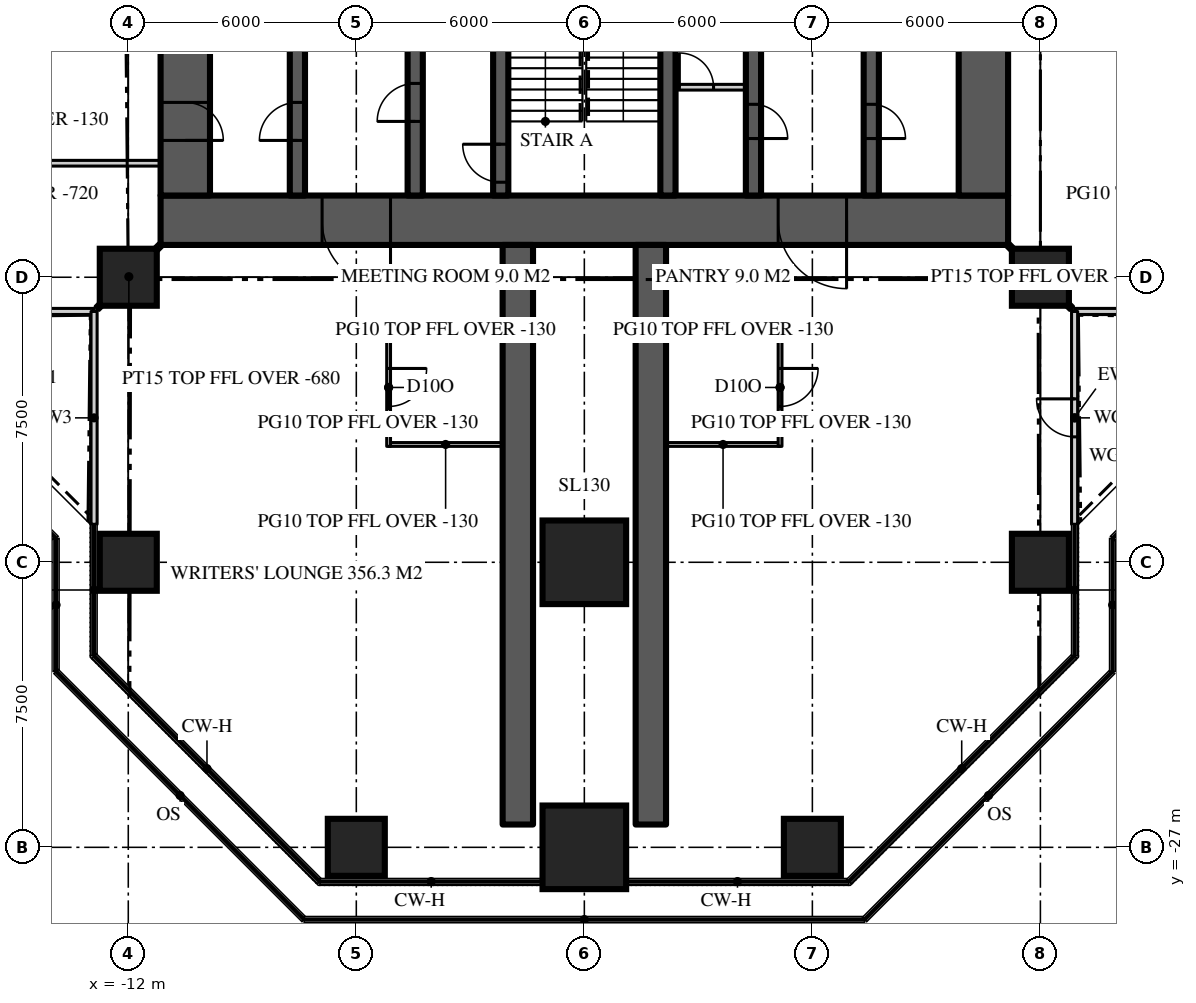
"""IFC4 building model, lengths in metres.
Left out: names, types, materials, properties, quantities, classifications, styles, units other than length and angle.
Written with IfcOpenShell. Run it as: python <this file> out.ifc"""

import sys

from ifc_helpers import new_model, si_unit, direction, frame, frame_2d, origin, origin_2d, place, context, subcontext, project, spatial, rectangle, extrude, element, fill, save


model = new_model("IFC4")
c1 = context("Model", 3, precision=1e-05, world=origin(), true_north=direction((0.0, 1.0)))
c2 = subcontext(c1, "Body", "Model", "MODEL_VIEW")
j1 = project(units=[si_unit("LENGTHUNIT", "METRE"), si_unit("PLANEANGLEUNIT", "RADIAN")], contexts=[c1])
p1 = place(None, origin())
s1 = spatial("IfcSite", under=j1, at=p1, CompositionType="ELEMENT")
p2 = place(p1, origin())
s2 = spatial("IfcBuilding", under=s1, at=p2, CompositionType="ELEMENT")
p3 = place(p2, frame((0.0, 0.0, 255.6)))
s3 = spatial("IfcBuildingStorey", under=s2, at=p3, CompositionType="ELEMENT", Elevation=255.6)
p4 = place(p3, frame((11.15, -10.5, 0.0), z_axis=(0.0, 0.0, 1.0), x_axis=(-1.0, 0.0, 0.0)))
e1 = element("IfcWall", 1, at=p4, inside=s3, PredefinedType="SHEAR", context=c2, shape_type="SweptSolid", body=[
    extrude(rectangle(XDim=22.3, YDim=1.3, at=frame_2d((11.15, 0.0))), origin(), (0.0, 0.0, 1.0), 3.9),
])
p5 = place(p4, frame((16.25, 0.0, 0.0)))
e2 = element("IfcOpeningElement", 2, at=p5, cuts=e1, PredefinedType="OPENING", context=c2, shape_type="SweptSolid", body=[
    extrude(rectangle(XDim=1.8, YDim=2.2, at=frame_2d((0.9, 1.1))), frame((0.0, 0.66, 0.0), z_axis=(0.0, -1.0, 0.0), x_axis=(1.0, 0.0, 0.0)), (0.0, 0.0, 1.0), 1.32),
])
p6 = place(p4, frame((4.25, 0.0, 0.0)))
e3 = element("IfcOpeningElement", 3, at=p6, cuts=e1, PredefinedType="OPENING", context=c2, shape_type="SweptSolid", body=[
    extrude(rectangle(XDim=1.8, YDim=2.2, at=frame_2d((0.9, 1.1))), frame((0.0, 0.66, 0.0), z_axis=(0.0, -1.0, 0.0), x_axis=(1.0, 0.0, 0.0)), (0.0, 0.0, 1.0), 1.32),
])
p7 = place(p3, frame((10.5, -9.85, 0.0), z_axis=(0.0, 0.0, 1.0), x_axis=(0.0, 1.0, 0.0)))
e4 = element("IfcWall", 4, at=p7, inside=s3, PredefinedType="SHEAR", context=c2, shape_type="SweptSolid", body=[
    extrude(rectangle(XDim=19.7, YDim=1.3, at=frame_2d((9.85, 0.0))), origin(), (0.0, 0.0, 1.0), 3.9),
])
p8 = place(p7, frame((17.25, 0.0, 0.0)))
e5 = element("IfcOpeningElement", 5, at=p8, cuts=e4, PredefinedType="OPENING", context=c2, shape_type="SweptSolid", body=[
    extrude(rectangle(XDim=1.0, YDim=2.2, at=frame_2d((0.5, 1.1))), frame((0.0, 0.66, 0.0), z_axis=(0.0, -1.0, 0.0), x_axis=(1.0, 0.0, 0.0)), (0.0, 0.0, 1.0), 1.32),
])
p9 = place(p3, frame((-10.5, 9.85, 0.0), z_axis=(0.0, 0.0, 1.0), x_axis=(0.0, -1.0, 0.0)))
e6 = element("IfcWall", 6, at=p9, inside=s3, PredefinedType="SHEAR", context=c2, shape_type="SweptSolid", body=[
    extrude(rectangle(XDim=19.7, YDim=1.3, at=frame_2d((9.85, 0.0))), origin(), (0.0, 0.0, 1.0), 3.9),
])
p10 = place(p9, frame((17.25, 0.0, 0.0)))
e7 = element("IfcOpeningElement", 7, at=p10, cuts=e6, PredefinedType="OPENING", context=c2, shape_type="SweptSolid", body=[
    extrude(rectangle(XDim=1.0, YDim=2.2, at=frame_2d((0.5, 1.1))), frame((0.0, 0.66, 0.0), z_axis=(0.0, -1.0, 0.0), x_axis=(1.0, 0.0, 0.0)), (0.0, 0.0, 1.0), 1.32),
])
for number, where, z_axis, x_axis in (
    (8, (-1.75, -11.15, 0.0), (0.0, 0.0, 1.0), (0.0, -1.0, 0.0)),
    (9, (1.75, -11.15, 0.0), (0.0, 0.0, 1.0), (0.0, -1.0, 0.0)),
):
    element("IfcWall", number, at=place(p3, frame(where, z_axis=z_axis, x_axis=x_axis)), inside=s3, PredefinedType="SHEAR", context=c2, shape_type="SweptSolid", body=[
        extrude(rectangle(XDim=15.25, YDim=0.8, at=frame_2d((7.625, 0.0))), origin(), (0.0, 0.0, 1.0), 3.9),
    ])
p11 = place(p3, frame((-6.0, -27.0, 0.0), z_axis=(0.0, 0.0, 1.0), x_axis=(1.0, 0.0, 0.0)))
e10 = element("IfcColumn", 10, at=p11, inside=s3, PredefinedType="COLUMN", context=c2, shape_type="SweptSolid", body=[
    extrude(rectangle(XDim=1.5, YDim=1.5, at=origin_2d()), origin(), (0.0, 0.0, 1.0), 3.9),
])
p12 = place(p3, frame((0.0, -27.0, 0.0), z_axis=(0.0, 0.0, 1.0), x_axis=(1.0, 0.0, 0.0)))
e11 = element("IfcColumn", 11, at=p12, inside=s3, PredefinedType="COLUMN", context=c2, shape_type="SweptSolid", body=[
    extrude(rectangle(XDim=2.2, YDim=2.2, at=origin_2d()), origin(), (0.0, 0.0, 1.0), 3.9),
])
for number, where, z_axis, x_axis in (
    (12, (6.0, -27.0, 0.0), (0.0, 0.0, 1.0), (1.0, 0.0, 0.0)),
    (13, (-12.0, -19.5, 0.0), (0.0, 0.0, 1.0), (1.0, 0.0, 0.0)),
):
    element("IfcColumn", number, at=place(p3, frame(where, z_axis=z_axis, x_axis=x_axis)), inside=s3, PredefinedType="COLUMN", context=c2, shape_type="SweptSolid", body=[
        extrude(rectangle(XDim=1.5, YDim=1.5, at=origin_2d()), origin(), (0.0, 0.0, 1.0), 3.9),
    ])
p13 = place(p3, frame((0.0, -19.5, 0.0), z_axis=(0.0, 0.0, 1.0), x_axis=(1.0, 0.0, 0.0)))
e14 = element("IfcColumn", 14, at=p13, inside=s3, PredefinedType="COLUMN", context=c2, shape_type="SweptSolid", body=[
    extrude(rectangle(XDim=2.2, YDim=2.2, at=origin_2d()), origin(), (0.0, 0.0, 1.0), 3.9),
])
for number, where, z_axis, x_axis in (
    (15, (12.0, -19.5, 0.0), (0.0, 0.0, 1.0), (1.0, 0.0, 0.0)),
    (16, (-12.0, -12.0, 0.0), (0.0, 0.0, 1.0), (1.0, 0.0, 0.0)),
    (17, (12.0, -12.0, 0.0), (0.0, 0.0, 1.0), (1.0, 0.0, 0.0)),
):
    element("IfcColumn", number, at=place(p3, frame(where, z_axis=z_axis, x_axis=x_axis)), inside=s3, PredefinedType="COLUMN", context=c2, shape_type="SweptSolid", body=[
        extrude(rectangle(XDim=1.5, YDim=1.5, at=origin_2d()), origin(), (0.0, 0.0, 1.0), 3.9),
    ])
p14 = place(p3, frame((12.9, -12.9, 0.0), z_axis=(0.0, 0.0, 1.0), x_axis=(1.0, 0.0, 0.0)))
e18 = element("IfcWall", 18, at=p14, inside=s3, PredefinedType="SOLIDWALL", context=c2, shape_type="SweptSolid", body=[
    extrude(rectangle(XDim=5.6, YDim=0.16, at=frame_2d((2.8, 0.0))), origin(), (0.0, 0.0, 1.0), 3.77),
])
p15 = place(p3, frame((-18.5, -12.9, 0.0), z_axis=(0.0, 0.0, 1.0), x_axis=(1.0, 0.0, 0.0)))
e19 = element("IfcWall", 19, at=p15, inside=s3, PredefinedType="SOLIDWALL", context=c2, shape_type="SweptSolid", body=[
    extrude(rectangle(XDim=5.6, YDim=0.16, at=frame_2d((2.8, 0.0))), origin(), (0.0, 0.0, 1.0), 3.77),
])
p16 = place(p15, frame((2.3, 0.0, 0.0)))
e20 = element("IfcOpeningElement", 20, at=p16, cuts=e19, PredefinedType="OPENING", context=c2, shape_type="SweptSolid", body=[
    extrude(rectangle(XDim=1.0, YDim=2.2, at=frame_2d((0.5, 1.1))), frame((0.0, 0.09, 0.0), z_axis=(0.0, -1.0, 0.0), x_axis=(1.0, 0.0, 0.0)), (0.0, 0.0, 1.0), 0.18),
])
p17 = place(p3, frame((-12.9, -12.9, 0.0), z_axis=(0.0, 0.0, 1.0), x_axis=(0.0, -1.0, 0.0)))
e21 = element("IfcWall", 21, at=p17, inside=s3, PredefinedType="SOLIDWALL", context=c2, shape_type="SweptSolid", body=[
    extrude(rectangle(XDim=5.6, YDim=0.16, at=frame_2d((2.8, 0.0))), origin(), (0.0, 0.0, 1.0), 3.77),
])
p18 = place(p3, frame((12.9, -18.5, 0.0), z_axis=(0.0, 0.0, 1.0), x_axis=(0.0, 1.0, 0.0)))
e22 = element("IfcWall", 22, at=p18, inside=s3, PredefinedType="SOLIDWALL", context=c2, shape_type="SweptSolid", body=[
    extrude(rectangle(XDim=5.6, YDim=0.16, at=frame_2d((2.8, 0.0))), origin(), (0.0, 0.0, 1.0), 3.77),
])
p19 = place(p18, frame((2.3, 0.0, 0.0)))
e23 = element("IfcOpeningElement", 23, at=p19, cuts=e22, PredefinedType="OPENING", context=c2, shape_type="SweptSolid", body=[
    extrude(rectangle(XDim=1.0, YDim=2.2, at=frame_2d((0.5, 1.1))), frame((0.0, 0.09, 0.0), z_axis=(0.0, -1.0, 0.0), x_axis=(1.0, 0.0, 0.0)), (0.0, 0.0, 1.0), 0.18),
])
p20 = place(p3, frame((-7.55, -9.85, 0.0), z_axis=(0.0, 0.0, 1.0), x_axis=(0.0, 1.0, 0.0)))
e24 = element("IfcWall", 24, at=p20, inside=s3, PredefinedType="SHEAR", context=c2, shape_type="SweptSolid", body=[
    extrude(rectangle(XDim=19.7, YDim=0.4, at=frame_2d((9.85, 0.0))), origin(), (0.0, 0.0, 1.0), 3.9),
])
p21 = place(p20, frame((1.45, 0.0, 0.0)))
e25 = element("IfcOpeningElement", 25, at=p21, cuts=e24, PredefinedType="OPENING", context=c2, shape_type="SweptSolid", body=[
    extrude(rectangle(XDim=1.0, YDim=2.2, at=frame_2d((0.5, 1.1))), frame((0.0, 0.21, 0.0), z_axis=(0.0, -1.0, 0.0), x_axis=(1.0, 0.0, 0.0)), (0.0, 0.0, 1.0), 0.42),
])
p22 = place(p20, frame((17.3, 0.0, 0.0)))
e26 = element("IfcOpeningElement", 26, at=p22, cuts=e24, PredefinedType="OPENING", context=c2, shape_type="SweptSolid", body=[
    extrude(rectangle(XDim=0.9, YDim=2.1, at=frame_2d((0.45, 1.05))), frame((0.0, 0.21, 0.0), z_axis=(0.0, -1.0, 0.0), x_axis=(1.0, 0.0, 0.0)), (0.0, 0.0, 1.0), 0.42),
])
p23 = place(p3, frame((7.55, 9.85, 0.0), z_axis=(0.0, 0.0, 1.0), x_axis=(0.0, -1.0, 0.0)))
e27 = element("IfcWall", 27, at=p23, inside=s3, PredefinedType="SHEAR", context=c2, shape_type="SweptSolid", body=[
    extrude(rectangle(XDim=19.7, YDim=0.4, at=frame_2d((9.85, 0.0))), origin(), (0.0, 0.0, 1.0), 3.9),
])
p24 = place(p23, frame((1.45, 0.0, 0.0)))
e28 = element("IfcOpeningElement", 28, at=p24, cuts=e27, PredefinedType="OPENING", context=c2, shape_type="SweptSolid", body=[
    extrude(rectangle(XDim=1.0, YDim=2.2, at=frame_2d((0.5, 1.1))), frame((0.0, 0.21, 0.0), z_axis=(0.0, -1.0, 0.0), x_axis=(1.0, 0.0, 0.0)), (0.0, 0.0, 1.0), 0.42),
])
p25 = place(p23, frame((17.3, 0.0, 0.0)))
e29 = element("IfcOpeningElement", 29, at=p25, cuts=e27, PredefinedType="OPENING", context=c2, shape_type="SweptSolid", body=[
    extrude(rectangle(XDim=0.9, YDim=2.1, at=frame_2d((0.45, 1.05))), frame((0.0, 0.21, 0.0), z_axis=(0.0, -1.0, 0.0), x_axis=(1.0, 0.0, 0.0)), (0.0, 0.0, 1.0), 0.42),
])
p26 = place(p3, frame((-4.45, -9.85, 0.0), z_axis=(0.0, 0.0, 1.0), x_axis=(0.0, 1.0, 0.0)))
e30 = element("IfcWall", 30, at=p26, inside=s3, PredefinedType="SHEAR", context=c2, shape_type="SweptSolid", body=[
    extrude(rectangle(XDim=19.7, YDim=0.4, at=frame_2d((9.85, 0.0))), origin(), (0.0, 0.0, 1.0), 3.9),
])
p27 = place(p26, frame((1.95, 0.0, 0.0)))
e31 = element("IfcOpeningElement", 31, at=p27, cuts=e30, PredefinedType="OPENING", context=c2, shape_type="SweptSolid", body=[
    extrude(rectangle(XDim=1.0, YDim=2.2, at=frame_2d((0.5, 1.1))), frame((0.0, 0.21, 0.0), z_axis=(0.0, -1.0, 0.0), x_axis=(1.0, 0.0, 0.0)), (0.0, 0.0, 1.0), 0.42),
])
p28 = place(p26, frame((17.25, 0.0, 0.0)))
e32 = element("IfcOpeningElement", 32, at=p28, cuts=e30, PredefinedType="OPENING", context=c2, shape_type="SweptSolid", body=[
    extrude(rectangle(XDim=1.0, YDim=2.1, at=frame_2d((0.5, 1.05))), frame((0.0, 0.21, 0.0), z_axis=(0.0, -1.0, 0.0), x_axis=(1.0, 0.0, 0.0)), (0.0, 0.0, 1.0), 0.42),
])
p29 = place(p3, frame((4.45, 9.85, 0.0), z_axis=(0.0, 0.0, 1.0), x_axis=(0.0, -1.0, 0.0)))
e33 = element("IfcWall", 33, at=p29, inside=s3, PredefinedType="SHEAR", context=c2, shape_type="SweptSolid", body=[
    extrude(rectangle(XDim=19.7, YDim=0.4, at=frame_2d((9.85, 0.0))), origin(), (0.0, 0.0, 1.0), 3.9),
])
p30 = place(p29, frame((1.95, 0.0, 0.0)))
e34 = element("IfcOpeningElement", 34, at=p30, cuts=e33, PredefinedType="OPENING", context=c2, shape_type="SweptSolid", body=[
    extrude(rectangle(XDim=1.0, YDim=2.2, at=frame_2d((0.5, 1.1))), frame((0.0, 0.21, 0.0), z_axis=(0.0, -1.0, 0.0), x_axis=(1.0, 0.0, 0.0)), (0.0, 0.0, 1.0), 0.42),
])
p31 = place(p29, frame((17.3, 0.0, 0.0)))
e35 = element("IfcOpeningElement", 35, at=p31, cuts=e33, PredefinedType="OPENING", context=c2, shape_type="SweptSolid", body=[
    extrude(rectangle(XDim=0.9, YDim=2.1, at=frame_2d((0.45, 1.05))), frame((0.0, 0.21, 0.0), z_axis=(0.0, -1.0, 0.0), x_axis=(1.0, 0.0, 0.0)), (0.0, 0.0, 1.0), 0.42),
])
p32 = place(p3, frame((-2.2, -9.85, 0.0), z_axis=(0.0, 0.0, 1.0), x_axis=(0.0, 1.0, 0.0)))
e36 = element("IfcWall", 36, at=p32, inside=s3, PredefinedType="SHEAR", context=c2, shape_type="SweptSolid", body=[
    extrude(rectangle(XDim=19.7, YDim=0.4, at=frame_2d((9.85, 0.0))), origin(), (0.0, 0.0, 1.0), 3.9),
])
p33 = place(p32, frame((0.35, 0.0, 0.0)))
e37 = element("IfcOpeningElement", 37, at=p33, cuts=e36, PredefinedType="OPENING", context=c2, shape_type="SweptSolid", body=[
    extrude(rectangle(XDim=1.0, YDim=2.2, at=frame_2d((0.5, 1.1))), frame((0.0, 0.21, 0.0), z_axis=(0.0, -1.0, 0.0), x_axis=(1.0, 0.0, 0.0)), (0.0, 0.0, 1.0), 0.42),
])
p34 = place(p3, frame((2.2, 9.85, 0.0), z_axis=(0.0, 0.0, 1.0), x_axis=(0.0, -1.0, 0.0)))
e38 = element("IfcWall", 38, at=p34, inside=s3, PredefinedType="SHEAR", context=c2, shape_type="SweptSolid", body=[
    extrude(rectangle(XDim=19.7, YDim=0.4, at=frame_2d((9.85, 0.0))), origin(), (0.0, 0.0, 1.0), 3.9),
])
p35 = place(p34, frame((0.35, 0.0, 0.0)))
e39 = element("IfcOpeningElement", 39, at=p35, cuts=e38, PredefinedType="OPENING", context=c2, shape_type="SweptSolid", body=[
    extrude(rectangle(XDim=1.0, YDim=2.2, at=frame_2d((0.5, 1.1))), frame((0.0, 0.21, 0.0), z_axis=(0.0, -1.0, 0.0), x_axis=(1.0, 0.0, 0.0)), (0.0, 0.0, 1.0), 0.42),
])
for number, where, z_axis, x_axis in (
    (40, (2.15, -13.4, 0.0), (0.0, 0.0, 1.0), (1.0, 0.0, 0.0)),
    (41, (2.15, -16.4, 0.0), (0.0, 0.0, 1.0), (1.0, 0.0, 0.0)),
):
    element("IfcWall", number, at=place(p3, frame(where, z_axis=z_axis, x_axis=x_axis)), inside=s3, PredefinedType="PARTITIONING", context=c2, shape_type="SweptSolid", body=[
        extrude(rectangle(XDim=3.0, YDim=0.1, at=frame_2d((1.5, 0.0))), origin(), (0.0, 0.0, 1.0), 3.77),
    ])
p36 = place(p3, frame((5.15, -13.35, 0.0), z_axis=(0.0, 0.0, 1.0), x_axis=(0.0, -1.0, 0.0)))
e42 = element("IfcWall", 42, at=p36, inside=s3, PredefinedType="PARTITIONING", context=c2, shape_type="SweptSolid", body=[
    extrude(rectangle(XDim=3.1, YDim=0.1, at=frame_2d((1.55, 0.0))), origin(), (0.0, 0.0, 1.0), 3.77),
])
p37 = place(p36, frame((1.05, 0.0, 0.0)))
e43 = element("IfcOpeningElement", 43, at=p37, cuts=e42, PredefinedType="OPENING", context=c2, shape_type="SweptSolid", body=[
    extrude(rectangle(XDim=1.0, YDim=2.2, at=frame_2d((0.5, 1.1))), frame((0.0, 0.06, 0.0), z_axis=(0.0, -1.0, 0.0), x_axis=(1.0, 0.0, 0.0)), (0.0, 0.0, 1.0), 0.12),
])
for number, where, z_axis, x_axis in (
    (44, (-2.15, -13.4, 0.0), (0.0, 0.0, 1.0), (-1.0, 0.0, 0.0)),
    (45, (-2.15, -16.4, 0.0), (0.0, 0.0, 1.0), (-1.0, 0.0, 0.0)),
):
    element("IfcWall", number, at=place(p3, frame(where, z_axis=z_axis, x_axis=x_axis)), inside=s3, PredefinedType="PARTITIONING", context=c2, shape_type="SweptSolid", body=[
        extrude(rectangle(XDim=3.0, YDim=0.1, at=frame_2d((1.5, 0.0))), origin(), (0.0, 0.0, 1.0), 3.77),
    ])
p38 = place(p3, frame((-5.15, -13.35, 0.0), z_axis=(0.0, 0.0, 1.0), x_axis=(0.0, -1.0, 0.0)))
e46 = element("IfcWall", 46, at=p38, inside=s3, PredefinedType="PARTITIONING", context=c2, shape_type="SweptSolid", body=[
    extrude(rectangle(XDim=3.1, YDim=0.1, at=frame_2d((1.55, 0.0))), origin(), (0.0, 0.0, 1.0), 3.77),
])
p39 = place(p38, frame((1.05, 0.0, 0.0)))
e47 = element("IfcOpeningElement", 47, at=p39, cuts=e46, PredefinedType="OPENING", context=c2, shape_type="SweptSolid", body=[
    extrude(rectangle(XDim=1.0, YDim=2.2, at=frame_2d((0.5, 1.1))), frame((0.0, 0.06, 0.0), z_axis=(0.0, -1.0, 0.0), x_axis=(1.0, 0.0, 0.0)), (0.0, 0.0, 1.0), 0.12),
])
for number, where, z_axis, x_axis in (
    (48, (-11.15, -11.15, 0.0), (0.0, 0.0, 1.0), (-0.707, -0.707, 0.0)),
    (49, (11.15, -11.15, 0.0), (0.0, 0.0, 1.0), (0.707, -0.707, 0.0)),
):
    element("IfcWall", number, at=place(p3, frame(where, z_axis=z_axis, x_axis=x_axis)), inside=s3, PredefinedType="PARTITIONING", context=c2, shape_type="SweptSolid", body=[
        extrude(rectangle(XDim=2.362, YDim=0.15, at=frame_2d((1.181, 0.0))), origin(), (0.0, 0.0, 1.0), 3.22),
    ])
p40 = place(p3, frame((-11.15, -9.0, 0.0), z_axis=(0.0, 0.0, 1.0), x_axis=(-1.0, 0.0, 0.0)))
e50 = element("IfcWall", 50, at=p40, inside=s3, PredefinedType="PARTITIONING", context=c2, shape_type="SweptSolid", body=[
    extrude(rectangle(XDim=6.225, YDim=0.15, at=frame_2d((3.113, 0.0))), origin(), (0.0, 0.0, 1.0), 3.77),
])
p41 = place(p3, frame((2.4, -7.0, 0.0), z_axis=(0.0, 0.0, 1.0), x_axis=(1.0, 0.0, 0.0)))
e51 = element("IfcWall", 51, at=p41, inside=s3, PredefinedType="SOLIDWALL", context=c2, shape_type="SweptSolid", body=[
    extrude(rectangle(XDim=1.85, YDim=0.15, at=frame_2d((0.925, 0.0))), origin(), (0.0, 0.0, 1.0), 3.77),
])
p42 = place(p41, frame((0.1, 0.0, 0.0)))
e52 = element("IfcOpeningElement", 52, at=p42, cuts=e51, PredefinedType="OPENING", context=c2, shape_type="SweptSolid", body=[
    extrude(rectangle(XDim=0.9, YDim=2.1, at=frame_2d((0.45, 1.05))), frame((0.0, 0.085, 0.0), z_axis=(0.0, -1.0, 0.0), x_axis=(1.0, 0.0, 0.0)), (0.0, 0.0, 1.0), 0.17),
])
p43 = place(p19, origin())
e53 = element("IfcDoor", 53, at=p43, inside=s3, OperationType="SINGLE_SWING_RIGHT", PredefinedType="DOOR", context=c2, shape_type="SweptSolid", body=[
    extrude(rectangle(XDim=1.0, YDim=2.2, at=frame_2d((0.5, 1.1))), frame((0.0, 0.025, 0.0), z_axis=(0.0, -1.0, 0.0), x_axis=(1.0, 0.0, 0.0)), (0.0, 0.0, 1.0), 0.05),
])
fill(e23, e53)
p44 = place(p5, origin())
e54 = element("IfcDoor", 54, at=p44, inside=s3, OperationType="DOUBLE_DOOR_DOUBLE_SWING", PredefinedType="DOOR", context=c2, shape_type="SweptSolid", body=[
    extrude(rectangle(XDim=1.8, YDim=2.2, at=frame_2d((0.9, 1.1))), frame((0.0, 0.025, 0.0), z_axis=(0.0, -1.0, 0.0), x_axis=(1.0, 0.0, 0.0)), (0.0, 0.0, 1.0), 0.05),
])
fill(e2, e54)
p45 = place(p6, origin())
e55 = element("IfcDoor", 55, at=p45, inside=s3, OperationType="DOUBLE_DOOR_DOUBLE_SWING", PredefinedType="DOOR", context=c2, shape_type="SweptSolid", body=[
    extrude(rectangle(XDim=1.8, YDim=2.2, at=frame_2d((0.9, 1.1))), frame((0.0, 0.025, 0.0), z_axis=(0.0, -1.0, 0.0), x_axis=(1.0, 0.0, 0.0)), (0.0, 0.0, 1.0), 0.05),
])
fill(e3, e55)
p46 = place(p21, origin())
e56 = element("IfcDoor", 56, at=p46, inside=s3, OperationType="SINGLE_SWING_LEFT", PredefinedType="DOOR", context=c2, shape_type="SweptSolid", body=[
    extrude(rectangle(XDim=1.0, YDim=2.2, at=frame_2d((0.5, 1.1))), frame((0.0, 0.025, 0.0), z_axis=(0.0, -1.0, 0.0), x_axis=(1.0, 0.0, 0.0)), (0.0, 0.0, 1.0), 0.05),
])
fill(e25, e56)
p47 = place(p10, origin())
e57 = element("IfcDoor", 57, at=p47, inside=s3, OperationType="SINGLE_SWING_RIGHT", PredefinedType="DOOR", context=c2, shape_type="SweptSolid", body=[
    extrude(rectangle(XDim=1.0, YDim=2.2, at=frame_2d((0.5, 1.1))), frame((0.0, 0.025, 0.0), z_axis=(0.0, -1.0, 0.0), x_axis=(1.0, 0.0, 0.0)), (0.0, 0.0, 1.0), 0.05),
])
fill(e7, e57)
p48 = place(p27, origin())
e58 = element("IfcDoor", 58, at=p48, inside=s3, OperationType="SINGLE_SWING_LEFT", PredefinedType="DOOR", context=c2, shape_type="SweptSolid", body=[
    extrude(rectangle(XDim=1.0, YDim=2.2, at=frame_2d((0.5, 1.1))), frame((0.0, 0.025, 0.0), z_axis=(0.0, -1.0, 0.0), x_axis=(1.0, 0.0, 0.0)), (0.0, 0.0, 1.0), 0.05),
])
fill(e31, e58)
p49 = place(p33, origin())
e59 = element("IfcDoor", 59, at=p49, inside=s3, OperationType="SINGLE_SWING_RIGHT", PredefinedType="DOOR", context=c2, shape_type="SweptSolid", body=[
    extrude(rectangle(XDim=1.0, YDim=2.2, at=frame_2d((0.5, 1.1))), frame((0.0, 0.025, 0.0), z_axis=(0.0, -1.0, 0.0), x_axis=(1.0, 0.0, 0.0)), (0.0, 0.0, 1.0), 0.05),
])
fill(e37, e59)
p50 = place(p25, origin())
e60 = element("IfcDoor", 60, at=p50, inside=s3, OperationType="SINGLE_SWING_RIGHT", PredefinedType="DOOR", context=c2, shape_type="SweptSolid", body=[
    extrude(rectangle(XDim=0.9, YDim=2.1, at=frame_2d((0.45, 1.05))), frame((0.0, 0.025, 0.0), z_axis=(0.0, -1.0, 0.0), x_axis=(1.0, 0.0, 0.0)), (0.0, 0.0, 1.0), 0.05),
])
fill(e29, e60)
p51 = place(p31, origin())
e61 = element("IfcDoor", 61, at=p51, inside=s3, OperationType="SINGLE_SWING_RIGHT", PredefinedType="DOOR", context=c2, shape_type="SweptSolid", body=[
    extrude(rectangle(XDim=0.9, YDim=2.1, at=frame_2d((0.45, 1.05))), frame((0.0, 0.025, 0.0), z_axis=(0.0, -1.0, 0.0), x_axis=(1.0, 0.0, 0.0)), (0.0, 0.0, 1.0), 0.05),
])
fill(e35, e61)
p52 = place(p37, origin())
e62 = element("IfcDoor", 62, at=p52, inside=s3, OperationType="SINGLE_SWING_LEFT", PredefinedType="DOOR", context=c2, shape_type="SweptSolid", body=[
    extrude(rectangle(XDim=1.0, YDim=2.2, at=frame_2d((0.5, 1.1))), frame((0.0, 0.025, 0.0), z_axis=(0.0, -1.0, 0.0), x_axis=(1.0, 0.0, 0.0)), (0.0, 0.0, 1.0), 0.05),
])
fill(e43, e62)
p53 = place(p39, origin())
e63 = element("IfcDoor", 63, at=p53, inside=s3, OperationType="SINGLE_SWING_LEFT", PredefinedType="DOOR", context=c2, shape_type="SweptSolid", body=[
    extrude(rectangle(XDim=1.0, YDim=2.2, at=frame_2d((0.5, 1.1))), frame((0.0, 0.025, 0.0), z_axis=(0.0, -1.0, 0.0), x_axis=(1.0, 0.0, 0.0)), (0.0, 0.0, 1.0), 0.05),
])
fill(e47, e63)
p54 = place(p42, origin())
e64 = element("IfcDoor", 64, at=p54, inside=s3, OperationType="SINGLE_SWING_LEFT", PredefinedType="DOOR", context=c2, shape_type="SweptSolid", body=[
    extrude(rectangle(XDim=0.9, YDim=2.1, at=frame_2d((0.45, 1.05))), frame((0.0, 0.025, 0.0), z_axis=(0.0, -1.0, 0.0), x_axis=(1.0, 0.0, 0.0)), (0.0, 0.0, 1.0), 0.05),
])
fill(e52, e64)
save(model, sys.argv[1])
